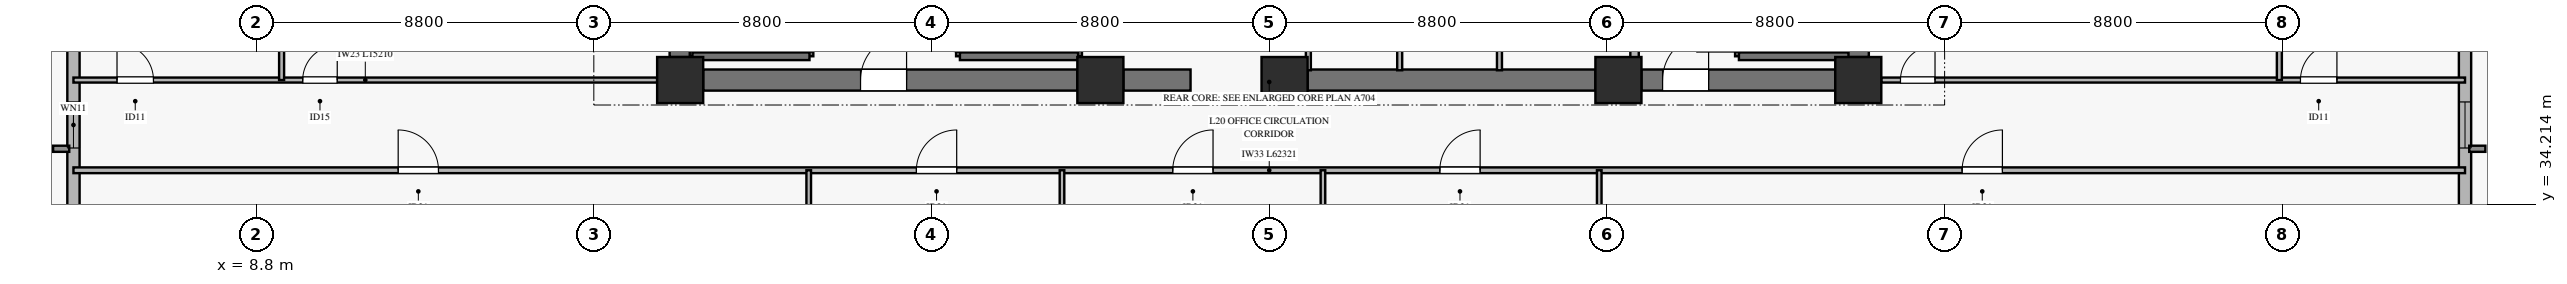
"""IFC4 building model, lengths in metres.
Left out: names, types, materials, properties, quantities, classifications, styles, units other than length and angle.
Written with IfcOpenShell. Run it as: python <this file> out.ifc"""

import sys

from ifc_helpers import new_model, si_unit, direction, frame, frame_2d, origin, origin_2d, place, context, subcontext, project, spatial, rectangle, extrude, source, transform, mapped, element, fill, save


model = new_model("IFC4")
c1 = context("Model", 3, precision=1e-05, world=origin(), true_north=direction((0.0, 1.0)))
c2 = subcontext(c1, "Body", "Model", "MODEL_VIEW")
j1 = project(units=[si_unit("LENGTHUNIT", "METRE"), si_unit("PLANEANGLEUNIT", "RADIAN")], contexts=[c1])
p1 = place(None, origin())
s1 = spatial("IfcSite", under=j1, at=p1, CompositionType="ELEMENT")
p2 = place(p1, origin())
s2 = spatial("IfcBuilding", under=s1, at=p2, CompositionType="ELEMENT")
p3 = place(p2, frame((0.0, 0.0, 83.5)))
s3 = spatial("IfcBuildingStorey", under=s2, at=p3, CompositionType="ELEMENT", Elevation=83.5)
m1 = source(origin(), c2, "Body", "SweptSolid", [
    extrude(rectangle(XDim=1.2, YDim=1.2, at=origin_2d()), origin(), (0.0, 0.0, 1.0), 3.68),
])
for number, where, z_axis, x_axis in (
    (1, (19.85, 37.45, 0.0), (0.0, 0.0, 1.0), (1.0, 0.0, 0.0)),
    (2, (30.8, 37.45, 0.0), (0.0, 0.0, 1.0), (1.0, 0.0, 0.0)),
    (3, (35.6, 37.45, 0.0), (0.0, 0.0, 1.0), (1.0, 0.0, 0.0)),
    (4, (44.3, 37.45, 0.0), (0.0, 0.0, 1.0), (1.0, 0.0, 0.0)),
    (5, (50.55, 37.45, 0.0), (0.0, 0.0, 1.0), (1.0, 0.0, 0.0)),
):
    element("IfcColumn", number, at=place(p3, frame(where, z_axis=z_axis, x_axis=x_axis)), inside=s3, PredefinedType="PILASTER", context=c2, shape_type="MappedRepresentation", body=[
        mapped(m1, transform((0.0, 0.0, 0.0), x_axis=(1.0, 0.0, 0.0), y_axis=(0.0, 1.0, 0.0), z_axis=(0.0, 0.0, 1.0), scale=1.0)),
    ])
p4 = place(p3, frame((20.45, 37.45, 0.0), z_axis=(0.0, 0.0, 1.0), x_axis=(1.0, 0.0, 0.0)))
e6 = element("IfcWall", 6, at=p4, inside=s3, PredefinedType="SHEAR", context=c2, shape_type="SweptSolid", body=[
    extrude(rectangle(XDim=9.75, YDim=0.55, at=frame_2d((4.875, 0.0))), origin(), (0.0, 0.0, 1.0), 3.68),
])
p5 = place(p4, frame((4.1, 0.0, 0.0)))
e7 = element("IfcOpeningElement", 7, at=p5, cuts=e6, PredefinedType="OPENING", context=c2, shape_type="SweptSolid", body=[
    extrude(rectangle(XDim=1.2, YDim=2.15, at=frame_2d((0.6, 1.075))), frame((0.0, 0.285, 0.0), z_axis=(0.0, -1.0, 0.0), x_axis=(1.0, 0.0, 0.0)), (0.0, 0.0, 1.0), 0.57),
])
p6 = place(p3, frame((31.4, 37.45, 0.0), z_axis=(0.0, 0.0, 1.0), x_axis=(1.0, 0.0, 0.0)))
e8 = element("IfcWall", 8, at=p6, inside=s3, PredefinedType="SHEAR", context=c2, shape_type="SweptSolid", body=[
    extrude(rectangle(XDim=1.75, YDim=0.55, at=frame_2d((0.875, 0.0))), origin(), (0.0, 0.0, 1.0), 3.68),
])
p7 = place(p3, frame((36.2, 37.45, 0.0), z_axis=(0.0, 0.0, 1.0), x_axis=(1.0, 0.0, 0.0)))
e9 = element("IfcWall", 9, at=p7, inside=s3, PredefinedType="SHEAR", context=c2, shape_type="SweptSolid", body=[
    extrude(rectangle(XDim=7.5, YDim=0.55, at=frame_2d((3.75, 0.0))), origin(), (0.0, 0.0, 1.0), 3.68),
])
p8 = place(p3, frame((44.9, 37.45, 0.0), z_axis=(0.0, 0.0, 1.0), x_axis=(1.0, 0.0, 0.0)))
e10 = element("IfcWall", 10, at=p8, inside=s3, PredefinedType="SHEAR", context=c2, shape_type="SweptSolid", body=[
    extrude(rectangle(XDim=5.05, YDim=0.55, at=frame_2d((2.525, 0.0))), origin(), (0.0, 0.0, 1.0), 3.68),
])
p9 = place(p8, frame((0.55, 0.0, 0.0)))
e11 = element("IfcOpeningElement", 11, at=p9, cuts=e10, PredefinedType="OPENING", context=c2, shape_type="SweptSolid", body=[
    extrude(rectangle(XDim=1.2, YDim=2.15, at=frame_2d((0.6, 1.075))), frame((0.0, 0.285, 0.0), z_axis=(0.0, -1.0, 0.0), x_axis=(1.0, 0.0, 0.0)), (0.0, 0.0, 1.0), 0.57),
])
for number, where, z_axis, x_axis in (
    (12, (19.85, 38.05, 0.0), (0.0, 0.0, 1.0), (0.0, 1.0, 0.0)),
    (13, (50.55, 38.05, 0.0), (0.0, 0.0, 1.0), (0.0, 1.0, 0.0)),
):
    element("IfcWall", number, at=place(p3, frame(where, z_axis=z_axis, x_axis=x_axis)), inside=s3, PredefinedType="SHEAR", context=c2, shape_type="SweptSolid", body=[
        extrude(rectangle(XDim=7.9, YDim=0.55, at=frame_2d((3.95, 0.0))), origin(), (0.0, 0.0, 1.0), 3.68),
    ])
p10 = place(p3, frame((4.04, 26.255, 0.0), z_axis=(0.0, 0.0, 1.0), x_axis=(0.0, 1.0, 0.0)))
e14 = element("IfcWall", 14, at=p10, inside=s3, PredefinedType="SOLIDWALL", context=c2, shape_type="SweptSolid", body=[
    extrude(rectangle(XDim=16.749, YDim=0.32, at=frame_2d((8.375, 0.0))), origin(), (0.0, 0.0, 1.0), 3.16),
])
p11 = place(p10, frame((9.425, 0.0, 0.45)))
e15 = element("IfcOpeningElement", 15, at=p11, cuts=e14, PredefinedType="OPENING", context=c2, shape_type="SweptSolid", body=[
    extrude(rectangle(XDim=1.2, YDim=2.0, at=frame_2d((0.6, 1.0))), frame((0.0, 0.17, 0.0), z_axis=(0.0, -1.0, 0.0), x_axis=(1.0, 0.0, 0.0)), (0.0, 0.0, 1.0), 0.34),
])
p12 = place(p3, frame((66.361, 26.255, 0.0), z_axis=(0.0, 0.0, 1.0), x_axis=(0.0, 1.0, 0.0)))
e16 = element("IfcWall", 16, at=p12, inside=s3, PredefinedType="SOLIDWALL", context=c2, shape_type="SweptSolid", body=[
    extrude(rectangle(XDim=16.749, YDim=0.32, at=frame_2d((8.375, 0.0))), origin(), (0.0, 0.0, 1.0), 3.16),
])
p13 = place(p12, frame((9.425, 0.0, 0.45)))
e17 = element("IfcOpeningElement", 17, at=p13, cuts=e16, PredefinedType="OPENING", context=c2, shape_type="SweptSolid", body=[
    extrude(rectangle(XDim=1.2, YDim=2.0, at=frame_2d((0.6, 1.0))), frame((0.0, 0.17, 0.0), z_axis=(0.0, -1.0, 0.0), x_axis=(1.0, 0.0, 0.0)), (0.0, 0.0, 1.0), 0.34),
])
p14 = place(p3, frame((20.17, 38.07, 0.0), z_axis=(0.0, 0.0, 1.0), x_axis=(0.0, 1.0, 0.0)))
e18 = element("IfcWall", 18, at=p14, inside=s3, PredefinedType="SOLIDWALL", context=c2, shape_type="SweptSolid", body=[
    extrude(rectangle(XDim=7.25, YDim=0.14, at=frame_2d((3.625, 0.0))), origin(), (0.0, 0.0, 1.0), 3.9),
])
p15 = place(p3, frame((23.22, 38.07, 0.0), z_axis=(0.0, 0.0, 1.0), x_axis=(0.0, 1.0, 0.0)))
e19 = element("IfcWall", 19, at=p15, inside=s3, PredefinedType="SOLIDWALL", context=c2, shape_type="SweptSolid", body=[
    extrude(rectangle(XDim=7.25, YDim=0.2, at=frame_2d((3.625, 0.0))), origin(), (0.0, 0.0, 1.0), 3.9),
])
p16 = place(p15, frame((0.11, 0.0, 0.0)))
e20 = element("IfcOpeningElement", 20, at=p16, cuts=e19, PredefinedType="OPENING", context=c2, shape_type="SweptSolid", body=[
    extrude(rectangle(XDim=1.1, YDim=2.15, at=frame_2d((0.55, 1.075))), frame((0.0, 0.11, 0.0), z_axis=(0.0, -1.0, 0.0), x_axis=(1.0, 0.0, 0.0)), (0.0, 0.0, 1.0), 0.22),
])
p17 = place(p3, frame((20.17, 38.07, 0.0), z_axis=(0.0, 0.0, 1.0), x_axis=(1.0, 0.0, 0.0)))
e21 = element("IfcWall", 21, at=p17, inside=s3, PredefinedType="SOLIDWALL", context=c2, shape_type="SweptSolid", body=[
    extrude(rectangle(XDim=3.05, YDim=0.2, at=frame_2d((1.525, 0.0))), origin(), (0.0, 0.0, 1.0), 3.9),
])
p18 = place(p3, frame((27.14, 38.07, 0.0), z_axis=(0.0, 0.0, 1.0), x_axis=(0.0, 1.0, 0.0)))
e22 = element("IfcWall", 22, at=p18, inside=s3, PredefinedType="SOLIDWALL", context=c2, shape_type="SweptSolid", body=[
    extrude(rectangle(XDim=7.25, YDim=0.2, at=frame_2d((3.625, 0.0))), origin(), (0.0, 0.0, 1.0), 3.9),
])
p19 = place(p18, frame((0.11, 0.0, 0.0)))
e23 = element("IfcOpeningElement", 23, at=p19, cuts=e22, PredefinedType="OPENING", context=c2, shape_type="SweptSolid", body=[
    extrude(rectangle(XDim=1.1, YDim=2.15, at=frame_2d((0.55, 1.075))), frame((0.0, 0.11, 0.0), z_axis=(0.0, -1.0, 0.0), x_axis=(1.0, 0.0, 0.0)), (0.0, 0.0, 1.0), 0.22),
])
p20 = place(p3, frame((30.22, 38.07, 0.0), z_axis=(0.0, 0.0, 1.0), x_axis=(0.0, 1.0, 0.0)))
e24 = element("IfcWall", 24, at=p20, inside=s3, PredefinedType="SOLIDWALL", context=c2, shape_type="SweptSolid", body=[
    extrude(rectangle(XDim=7.25, YDim=0.2, at=frame_2d((3.625, 0.0))), origin(), (0.0, 0.0, 1.0), 3.9),
])
p21 = place(p3, frame((27.14, 38.07, 0.0), z_axis=(0.0, 0.0, 1.0), x_axis=(1.0, 0.0, 0.0)))
e25 = element("IfcWall", 25, at=p21, inside=s3, PredefinedType="SOLIDWALL", context=c2, shape_type="SweptSolid", body=[
    extrude(rectangle(XDim=3.08, YDim=0.2, at=frame_2d((1.54, 0.0))), origin(), (0.0, 0.0, 1.0), 3.9),
])
p22 = place(p3, frame((47.44, 38.07, 0.0), z_axis=(0.0, 0.0, 1.0), x_axis=(0.0, 1.0, 0.0)))
e26 = element("IfcWall", 26, at=p22, inside=s3, PredefinedType="SOLIDWALL", context=c2, shape_type="SweptSolid", body=[
    extrude(rectangle(XDim=7.25, YDim=0.2, at=frame_2d((3.625, 0.0))), origin(), (0.0, 0.0, 1.0), 3.9),
])
p23 = place(p22, frame((0.11, 0.0, 0.0)))
e27 = element("IfcOpeningElement", 27, at=p23, cuts=e26, PredefinedType="OPENING", context=c2, shape_type="SweptSolid", body=[
    extrude(rectangle(XDim=1.1, YDim=2.15, at=frame_2d((0.55, 1.075))), frame((0.0, 0.11, 0.0), z_axis=(0.0, -1.0, 0.0), x_axis=(1.0, 0.0, 0.0)), (0.0, 0.0, 1.0), 0.22),
])
p24 = place(p3, frame((47.44, 38.07, 0.0), z_axis=(0.0, 0.0, 1.0), x_axis=(1.0, 0.0, 0.0)))
e28 = element("IfcWall", 28, at=p24, inside=s3, PredefinedType="SOLIDWALL", context=c2, shape_type="SweptSolid", body=[
    extrude(rectangle(XDim=2.855, YDim=0.2, at=frame_2d((1.427, 0.0))), origin(), (0.0, 0.0, 1.0), 3.9),
])
p25 = place(p3, frame((44.72, 37.705, 0.0), z_axis=(0.0, 0.0, 1.0), x_axis=(0.0, 1.0, 0.0)))
e29 = element("IfcWall", 29, at=p25, inside=s3, PredefinedType="SOLIDWALL", context=c2, shape_type="SweptSolid", body=[
    extrude(rectangle(XDim=7.515, YDim=0.22, at=frame_2d((3.757, 0.0))), origin(), (0.0, 0.0, 1.0), 3.68),
])
p26 = place(p3, frame((36.22, 37.705, 0.0), z_axis=(0.0, 0.0, 1.0), x_axis=(0.0, 1.0, 0.0)))
e30 = element("IfcWall", 30, at=p26, inside=s3, PredefinedType="PARTITIONING", context=c2, shape_type="SweptSolid", body=[
    extrude(rectangle(XDim=2.215, YDim=0.13, at=frame_2d((1.107, 0.0))), origin(), (0.0, 0.0, 1.0), 3.68),
])
p27 = place(p26, frame((0.905, 0.0, 0.0)))
e31 = element("IfcOpeningElement", 31, at=p27, cuts=e30, PredefinedType="OPENING", context=c2, shape_type="SweptSolid", body=[
    extrude(rectangle(XDim=0.9, YDim=2.1, at=frame_2d((0.45, 1.05))), frame((0.0, 0.075, 0.0), z_axis=(0.0, -1.0, 0.0), x_axis=(1.0, 0.0, 0.0)), (0.0, 0.0, 1.0), 0.15),
])
p28 = place(p3, frame((38.6, 37.705, 0.0), z_axis=(0.0, 0.0, 1.0), x_axis=(0.0, 1.0, 0.0)))
e32 = element("IfcWall", 32, at=p28, inside=s3, PredefinedType="PARTITIONING", context=c2, shape_type="SweptSolid", body=[
    extrude(rectangle(XDim=2.215, YDim=0.13, at=frame_2d((1.107, 0.0))), origin(), (0.0, 0.0, 1.0), 3.68),
])
p29 = place(p28, frame((0.615, 0.0, 0.0)))
e33 = element("IfcOpeningElement", 33, at=p29, cuts=e32, PredefinedType="OPENING", context=c2, shape_type="SweptSolid", body=[
    extrude(rectangle(XDim=0.9, YDim=2.1, at=frame_2d((0.45, 1.05))), frame((0.0, 0.075, 0.0), z_axis=(0.0, -1.0, 0.0), x_axis=(1.0, 0.0, 0.0)), (0.0, 0.0, 1.0), 0.15),
])
p30 = place(p3, frame((41.2, 37.705, 0.0), z_axis=(0.0, 0.0, 1.0), x_axis=(0.0, 1.0, 0.0)))
e34 = element("IfcWall", 34, at=p30, inside=s3, PredefinedType="PARTITIONING", context=c2, shape_type="SweptSolid", body=[
    extrude(rectangle(XDim=2.215, YDim=0.13, at=frame_2d((1.107, 0.0))), origin(), (0.0, 0.0, 1.0), 3.68),
])
p31 = place(p30, frame((0.615, 0.0, 0.0)))
e35 = element("IfcOpeningElement", 35, at=p31, cuts=e34, PredefinedType="OPENING", context=c2, shape_type="SweptSolid", body=[
    extrude(rectangle(XDim=0.9, YDim=2.1, at=frame_2d((0.45, 1.05))), frame((0.0, 0.075, 0.0), z_axis=(0.0, -1.0, 0.0), x_axis=(1.0, 0.0, 0.0)), (0.0, 0.0, 1.0), 0.15),
])
p32 = place(p3, frame((4.04, 35.1, 0.0), z_axis=(0.0, 0.0, 1.0), x_axis=(1.0, 0.0, 0.0)))
e36 = element("IfcWall", 36, at=p32, inside=s3, PredefinedType="PARTITIONING", context=c2, shape_type="SweptSolid", body=[
    extrude(rectangle(XDim=62.321, YDim=0.15, at=frame_2d((31.161, 0.0))), origin(), (0.0, 0.0, 1.0), 2.765),
])
p33 = place(p32, frame((8.462, 0.0, 0.0)))
e37 = element("IfcOpeningElement", 37, at=p33, cuts=e36, PredefinedType="OPENING", context=c2, shape_type="SweptSolid", body=[
    extrude(rectangle(XDim=1.05, YDim=2.15, at=frame_2d((0.525, 1.075))), frame((0.0, 0.085, 0.0), z_axis=(0.0, -1.0, 0.0), x_axis=(1.0, 0.0, 0.0)), (0.0, 0.0, 1.0), 0.17),
])
p34 = place(p32, frame((21.966, 0.0, 0.0)))
e38 = element("IfcOpeningElement", 38, at=p34, cuts=e36, PredefinedType="OPENING", context=c2, shape_type="SweptSolid", body=[
    extrude(rectangle(XDim=1.05, YDim=2.15, at=frame_2d((0.525, 1.075))), frame((0.0, 0.085, 0.0), z_axis=(0.0, -1.0, 0.0), x_axis=(1.0, 0.0, 0.0)), (0.0, 0.0, 1.0), 0.17),
])
p35 = place(p32, frame((28.646, 0.0, 0.0)))
e39 = element("IfcOpeningElement", 39, at=p35, cuts=e36, PredefinedType="OPENING", context=c2, shape_type="SweptSolid", body=[
    extrude(rectangle(XDim=1.05, YDim=2.15, at=frame_2d((0.525, 1.075))), frame((0.0, 0.085, 0.0), z_axis=(0.0, -1.0, 0.0), x_axis=(1.0, 0.0, 0.0)), (0.0, 0.0, 1.0), 0.17),
])
p36 = place(p32, frame((35.606, 0.0, 0.0)))
e40 = element("IfcOpeningElement", 40, at=p36, cuts=e36, PredefinedType="OPENING", context=c2, shape_type="SweptSolid", body=[
    extrude(rectangle(XDim=1.05, YDim=2.15, at=frame_2d((0.525, 1.075))), frame((0.0, 0.085, 0.0), z_axis=(0.0, -1.0, 0.0), x_axis=(1.0, 0.0, 0.0)), (0.0, 0.0, 1.0), 0.17),
])
p37 = place(p32, frame((49.216, 0.0, 0.0)))
e41 = element("IfcOpeningElement", 41, at=p37, cuts=e36, PredefinedType="OPENING", context=c2, shape_type="SweptSolid", body=[
    extrude(rectangle(XDim=1.05, YDim=2.15, at=frame_2d((0.525, 1.075))), frame((0.0, 0.085, 0.0), z_axis=(0.0, -1.0, 0.0), x_axis=(1.0, 0.0, 0.0)), (0.0, 0.0, 1.0), 0.17),
])
for number, where, z_axis, x_axis in (
    (42, (23.2, 5.409, 0.0), (0.0, 0.0, 1.0), (0.0, 1.0, 0.0)),
    (43, (29.8, 5.409, 0.0), (0.0, 0.0, 1.0), (0.0, 1.0, 0.0)),
    (44, (36.6, 5.409, 0.0), (0.0, 0.0, 1.0), (0.0, 1.0, 0.0)),
    (45, (43.8, 5.409, 0.0), (0.0, 0.0, 1.0), (0.0, 1.0, 0.0)),
):
    element("IfcWall", number, at=place(p3, frame(where, z_axis=z_axis, x_axis=x_axis)), inside=s3, PredefinedType="PARTITIONING", context=c2, shape_type="SweptSolid", body=[
        extrude(rectangle(XDim=29.691, YDim=0.12, at=frame_2d((14.846, 0.0))), origin(), (0.0, 0.0, 1.0), 3.165),
    ])
p38 = place(p3, frame((4.04, 37.45, 0.0), z_axis=(0.0, 0.0, 1.0), x_axis=(1.0, 0.0, 0.0)))
e46 = element("IfcWall", 46, at=p38, inside=s3, PredefinedType="PARTITIONING", context=c2, shape_type="SweptSolid", body=[
    extrude(rectangle(XDim=15.21, YDim=0.13, at=frame_2d((7.605, 0.0))), origin(), (0.0, 0.0, 1.0), 3.165),
])
p39 = place(p38, frame((1.135, 0.0, 0.0)))
e47 = element("IfcOpeningElement", 47, at=p39, cuts=e46, PredefinedType="OPENING", context=c2, shape_type="SweptSolid", body=[
    extrude(rectangle(XDim=0.95, YDim=2.1, at=frame_2d((0.475, 1.05))), frame((0.0, 0.075, 0.0), z_axis=(0.0, -1.0, 0.0), x_axis=(1.0, 0.0, 0.0)), (0.0, 0.0, 1.0), 0.15),
])
p40 = place(p38, frame((5.974, 0.0, 0.0)))
e48 = element("IfcOpeningElement", 48, at=p40, cuts=e46, PredefinedType="OPENING", context=c2, shape_type="SweptSolid", body=[
    extrude(rectangle(XDim=0.9, YDim=2.1, at=frame_2d((0.45, 1.05))), frame((0.0, 0.075, 0.0), z_axis=(0.0, -1.0, 0.0), x_axis=(1.0, 0.0, 0.0)), (0.0, 0.0, 1.0), 0.15),
])
p41 = place(p3, frame((9.464, 37.45, 0.0), z_axis=(0.0, 0.0, 1.0), x_axis=(0.0, 1.0, 0.0)))
e49 = element("IfcWall", 49, at=p41, inside=s3, PredefinedType="PARTITIONING", context=c2, shape_type="SweptSolid", body=[
    extrude(rectangle(XDim=8.8, YDim=0.13, at=frame_2d((4.4, 0.0))), origin(), (0.0, 0.0, 1.0), 3.68),
])
p42 = place(p3, frame((51.15, 37.45, 0.0), z_axis=(0.0, 0.0, 1.0), x_axis=(1.0, 0.0, 0.0)))
e50 = element("IfcWall", 50, at=p42, inside=s3, PredefinedType="PARTITIONING", context=c2, shape_type="SweptSolid", body=[
    extrude(rectangle(XDim=15.211, YDim=0.13, at=frame_2d((7.605, 0.0))), origin(), (0.0, 0.0, 1.0), 3.165),
])
p43 = place(p42, frame((0.5, 0.0, 0.0)))
e51 = element("IfcOpeningElement", 51, at=p43, cuts=e50, PredefinedType="OPENING", context=c2, shape_type="SweptSolid", body=[
    extrude(rectangle(XDim=0.9, YDim=2.1, at=frame_2d((0.45, 1.05))), frame((0.0, 0.075, 0.0), z_axis=(0.0, -1.0, 0.0), x_axis=(1.0, 0.0, 0.0)), (0.0, 0.0, 1.0), 0.15),
])
p44 = place(p42, frame((10.923, 0.0, 0.0)))
e52 = element("IfcOpeningElement", 52, at=p44, cuts=e50, PredefinedType="OPENING", context=c2, shape_type="SweptSolid", body=[
    extrude(rectangle(XDim=0.95, YDim=2.1, at=frame_2d((0.475, 1.05))), frame((0.0, 0.075, 0.0), z_axis=(0.0, -1.0, 0.0), x_axis=(1.0, 0.0, 0.0)), (0.0, 0.0, 1.0), 0.15),
])
p45 = place(p3, frame((61.523, 37.45, 0.0), z_axis=(0.0, 0.0, 1.0), x_axis=(0.0, 1.0, 0.0)))
e53 = element("IfcWall", 53, at=p45, inside=s3, PredefinedType="PARTITIONING", context=c2, shape_type="SweptSolid", body=[
    extrude(rectangle(XDim=8.8, YDim=0.13, at=frame_2d((4.4, 0.0))), origin(), (0.0, 0.0, 1.0), 3.68),
])
m2 = source(origin(), c2, "Body", "SweptSolid", [
    extrude(rectangle(XDim=1.2, YDim=2.0, at=frame_2d((0.6, 1.0))), frame((0.0, 0.03, 0.0), z_axis=(0.0, -1.0, 0.0), x_axis=(1.0, 0.0, 0.0)), (0.0, 0.0, 1.0), 0.06),
])
p46 = place(p11, origin())
e54 = element("IfcWindow", 54, at=p46, inside=s3, PartitioningType="SINGLE_PANEL", PredefinedType="WINDOW", context=c2, shape_type="MappedRepresentation", body=[
    mapped(m2, transform((0.0, 0.0, 0.0), x_axis=(1.0, 0.0, 0.0), y_axis=(0.0, 1.0, 0.0), z_axis=(0.0, 0.0, 1.0), scale=1.0)),
])
fill(e15, e54)
p47 = place(p13, origin())
e55 = element("IfcWindow", 55, at=p47, inside=s3, PartitioningType="SINGLE_PANEL", PredefinedType="WINDOW", context=c2, shape_type="MappedRepresentation", body=[
    mapped(m2, transform((0.0, 0.0, 0.0), x_axis=(1.0, 0.0, 0.0), y_axis=(0.0, 1.0, 0.0), z_axis=(0.0, 0.0, 1.0), scale=1.0)),
])
fill(e17, e55)
m3 = source(origin(), c2, "Body", "SweptSolid", [
    extrude(rectangle(XDim=1.2, YDim=2.15, at=frame_2d((0.6, 1.075))), frame((0.0, 0.025, 0.0), z_axis=(0.0, -1.0, 0.0), x_axis=(1.0, 0.0, 0.0)), (0.0, 0.0, 1.0), 0.05),
])
p48 = place(p5, origin())
e56 = element("IfcDoor", 56, at=p48, inside=s3, OperationType="SINGLE_SWING_RIGHT", PredefinedType="DOOR", context=c2, shape_type="MappedRepresentation", body=[
    mapped(m3, transform((0.0, 0.0, 0.0), x_axis=(1.0, 0.0, 0.0), y_axis=(0.0, 1.0, 0.0), z_axis=(0.0, 0.0, 1.0), scale=1.0)),
])
fill(e7, e56)
p49 = place(p9, origin())
e57 = element("IfcDoor", 57, at=p49, inside=s3, OperationType="SINGLE_SWING_RIGHT", PredefinedType="DOOR", context=c2, shape_type="MappedRepresentation", body=[
    mapped(m3, transform((0.0, 0.0, 0.0), x_axis=(1.0, 0.0, 0.0), y_axis=(0.0, 1.0, 0.0), z_axis=(0.0, 0.0, 1.0), scale=1.0)),
])
fill(e11, e57)
m4 = source(origin(), c2, "Body", "SweptSolid", [
    extrude(rectangle(XDim=1.05, YDim=2.15, at=frame_2d((0.525, 1.075))), frame((0.0, 0.025, 0.0), z_axis=(0.0, -1.0, 0.0), x_axis=(1.0, 0.0, 0.0)), (0.0, 0.0, 1.0), 0.05),
])
p50 = place(p33, origin())
e58 = element("IfcDoor", 58, at=p50, inside=s3, OperationType="SINGLE_SWING_LEFT", PredefinedType="DOOR", context=c2, shape_type="MappedRepresentation", body=[
    mapped(m4, transform((0.0, 0.0, 0.0), x_axis=(1.0, 0.0, 0.0), y_axis=(0.0, 1.0, 0.0), z_axis=(0.0, 0.0, 1.0), scale=1.0)),
])
fill(e37, e58)
p51 = place(p34, origin())
e59 = element("IfcDoor", 59, at=p51, inside=s3, OperationType="SINGLE_SWING_RIGHT", PredefinedType="DOOR", context=c2, shape_type="MappedRepresentation", body=[
    mapped(m4, transform((0.0, 0.0, 0.0), x_axis=(1.0, 0.0, 0.0), y_axis=(0.0, 1.0, 0.0), z_axis=(0.0, 0.0, 1.0), scale=1.0)),
])
fill(e38, e59)
p52 = place(p35, origin())
e60 = element("IfcDoor", 60, at=p52, inside=s3, OperationType="SINGLE_SWING_RIGHT", PredefinedType="DOOR", context=c2, shape_type="MappedRepresentation", body=[
    mapped(m4, transform((0.0, 0.0, 0.0), x_axis=(1.0, 0.0, 0.0), y_axis=(0.0, 1.0, 0.0), z_axis=(0.0, 0.0, 1.0), scale=1.0)),
])
fill(e39, e60)
p53 = place(p36, origin())
e61 = element("IfcDoor", 61, at=p53, inside=s3, OperationType="SINGLE_SWING_RIGHT", PredefinedType="DOOR", context=c2, shape_type="MappedRepresentation", body=[
    mapped(m4, transform((0.0, 0.0, 0.0), x_axis=(1.0, 0.0, 0.0), y_axis=(0.0, 1.0, 0.0), z_axis=(0.0, 0.0, 1.0), scale=1.0)),
])
fill(e40, e61)
p54 = place(p37, origin())
e62 = element("IfcDoor", 62, at=p54, inside=s3, OperationType="SINGLE_SWING_RIGHT", PredefinedType="DOOR", context=c2, shape_type="MappedRepresentation", body=[
    mapped(m4, transform((0.0, 0.0, 0.0), x_axis=(1.0, 0.0, 0.0), y_axis=(0.0, 1.0, 0.0), z_axis=(0.0, 0.0, 1.0), scale=1.0)),
])
fill(e41, e62)
m5 = source(origin(), c2, "Body", "SweptSolid", [
    extrude(rectangle(XDim=0.95, YDim=2.1, at=frame_2d((0.475, 1.05))), frame((0.0, 0.025, 0.0), z_axis=(0.0, -1.0, 0.0), x_axis=(1.0, 0.0, 0.0)), (0.0, 0.0, 1.0), 0.05),
])
p55 = place(p39, origin())
e63 = element("IfcDoor", 63, at=p55, inside=s3, OperationType="SINGLE_SWING_LEFT", PredefinedType="DOOR", context=c2, shape_type="MappedRepresentation", body=[
    mapped(m5, transform((0.0, 0.0, 0.0), x_axis=(1.0, 0.0, 0.0), y_axis=(0.0, 1.0, 0.0), z_axis=(0.0, 0.0, 1.0), scale=1.0)),
])
fill(e47, e63)
m6 = source(origin(), c2, "Body", "SweptSolid", [
    extrude(rectangle(XDim=0.9, YDim=2.1, at=frame_2d((0.45, 1.05))), frame((0.0, 0.025, 0.0), z_axis=(0.0, -1.0, 0.0), x_axis=(1.0, 0.0, 0.0)), (0.0, 0.0, 1.0), 0.05),
])
p56 = place(p40, origin())
e64 = element("IfcDoor", 64, at=p56, inside=s3, OperationType="SINGLE_SWING_RIGHT", PredefinedType="DOOR", context=c2, shape_type="MappedRepresentation", body=[
    mapped(m6, transform((0.0, 0.0, 0.0), x_axis=(1.0, 0.0, 0.0), y_axis=(0.0, 1.0, 0.0), z_axis=(0.0, 0.0, 1.0), scale=1.0)),
])
fill(e48, e64)
p57 = place(p43, origin())
e65 = element("IfcDoor", 65, at=p57, inside=s3, OperationType="SINGLE_SWING_RIGHT", PredefinedType="DOOR", context=c2, shape_type="MappedRepresentation", body=[
    mapped(m6, transform((0.0, 0.0, 0.0), x_axis=(1.0, 0.0, 0.0), y_axis=(0.0, 1.0, 0.0), z_axis=(0.0, 0.0, 1.0), scale=1.0)),
])
fill(e51, e65)
p58 = place(p44, origin())
e66 = element("IfcDoor", 66, at=p58, inside=s3, OperationType="SINGLE_SWING_RIGHT", PredefinedType="DOOR", context=c2, shape_type="MappedRepresentation", body=[
    mapped(m5, transform((0.0, 0.0, 0.0), x_axis=(1.0, 0.0, 0.0), y_axis=(0.0, 1.0, 0.0), z_axis=(0.0, 0.0, 1.0), scale=1.0)),
])
fill(e52, e66)
save(model, sys.argv[1])
